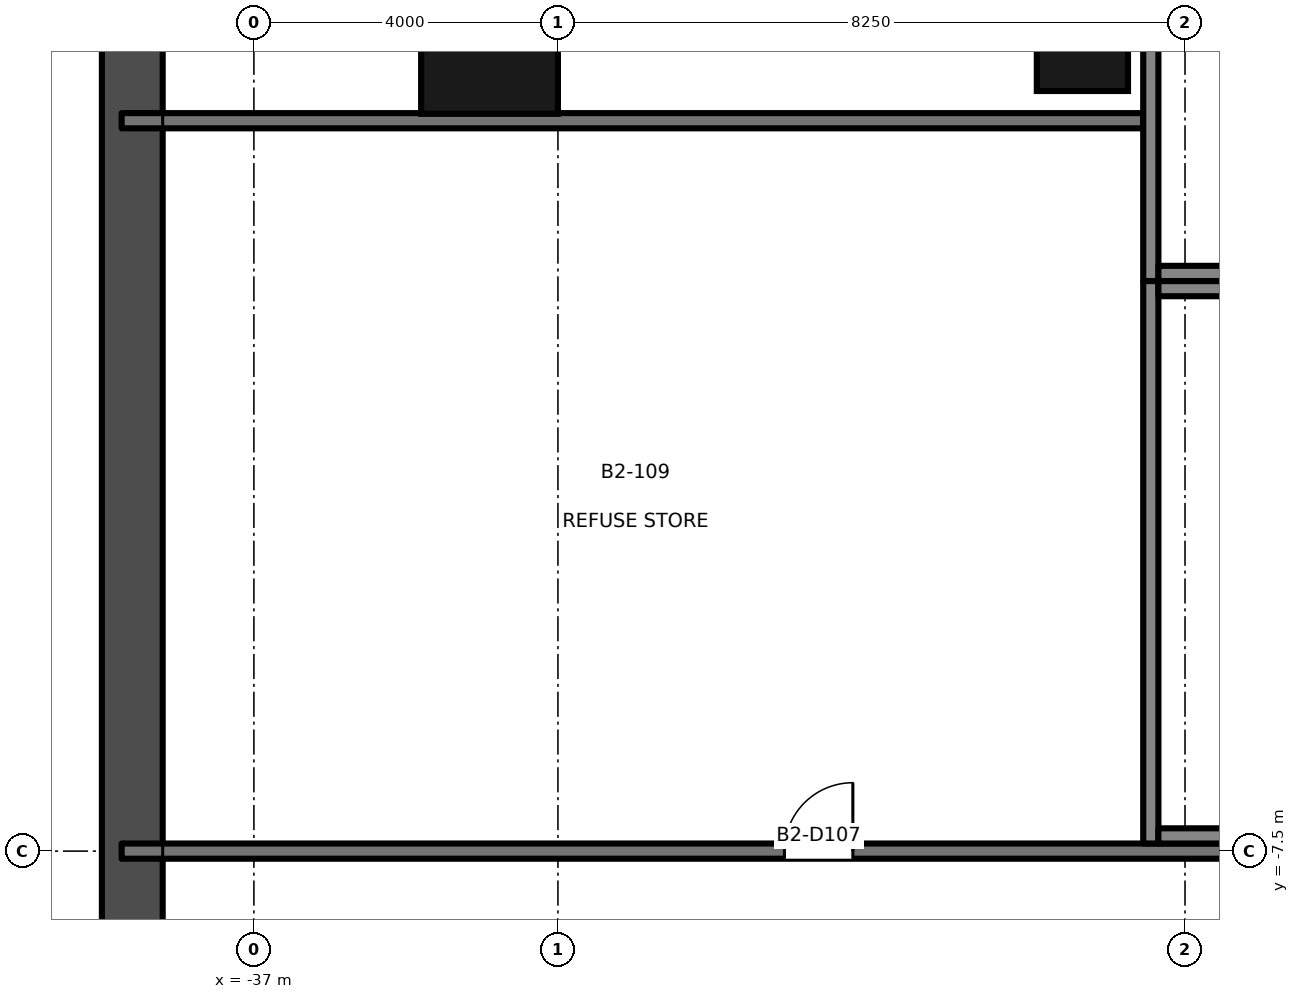
"""IFC4 building model, lengths in metres.
Left out: names, types, materials, properties, quantities, classifications, styles, units other than length and angle.
Written with IfcOpenShell. Run it as: python <this file> out.ifc"""

import sys

from ifc_helpers import new_model, si_unit, direction, frame, frame_2d, origin, origin_2d, place, context, subcontext, project, spatial, rectangle, extrude, element, fill, save


model = new_model("IFC4")
c1 = context("Model", 3, precision=1e-05, world=origin(), true_north=direction((0.0, 1.0)))
c2 = subcontext(c1, "Body", "Model", "MODEL_VIEW")
j1 = project(units=[si_unit("LENGTHUNIT", "METRE"), si_unit("PLANEANGLEUNIT", "RADIAN")], contexts=[c1])
p1 = place(None, origin())
s1 = spatial("IfcSite", under=j1, at=p1, CompositionType="ELEMENT")
p2 = place(p1, origin())
s2 = spatial("IfcBuilding", under=s1, at=p2, CompositionType="ELEMENT")
p3 = place(p2, frame((0.0, 0.0, -9.5)))
s3 = spatial("IfcBuildingStorey", under=s2, at=p3, CompositionType="ELEMENT", Elevation=-9.5)
p4 = place(p3, frame((-38.6, -38.7, -0.2), z_axis=(0.0, 0.0, 1.0), x_axis=(0.0, 1.0, 0.0)))
e1 = element("IfcWall", 1, at=p4, inside=s3, PredefinedType="SOLIDWALL", context=c2, shape_type="SweptSolid", body=[
    extrude(rectangle(XDim=51.9, YDim=0.8, at=frame_2d((25.95, 0.0))), origin(), (0.0, 0.0, 1.0), 4.0),
])
p5 = place(p3, frame((-33.9, 3.1, -0.2), z_axis=(0.0, 0.0, 1.0), x_axis=(0.0, 1.0, 0.0)))
e2 = element("IfcColumn", 2, at=p5, inside=s3, PredefinedType="COLUMN", context=c2, shape_type="SweptSolid", body=[
    extrude(rectangle(XDim=1.8, YDim=1.8, at=origin_2d()), origin(), (0.0, 0.0, 1.0), 4.0),
])
p6 = place(p3, frame((-26.1, 3.1, -0.2), z_axis=(0.0, 0.0, 1.0), x_axis=(1.0, 0.0, 0.0)))
e3 = element("IfcColumn", 3, at=p6, inside=s3, PredefinedType="COLUMN", context=c2, shape_type="SweptSolid", body=[
    extrude(rectangle(XDim=1.2, YDim=1.2, at=origin_2d()), origin(), (0.0, 0.0, 1.0), 4.0),
])
p7 = place(p3, frame((-25.2, -7.4, -0.2), z_axis=(0.0, 0.0, 1.0), x_axis=(0.0, 1.0, 0.0)))
e4 = element("IfcWall", 4, at=p7, inside=s3, PredefinedType="SHEAR", context=c2, shape_type="SweptSolid", body=[
    extrude(rectangle(XDim=7.4, YDim=0.2, at=frame_2d((3.7, 0.0))), origin(), (0.0, 0.0, 1.0), 4.0),
])
for number, where, z_axis, x_axis in (
    (5, (-25.1, -0.1, -0.2), (0.0, 0.0, 1.0), (1.0, 0.0, 0.0)),
    (6, (-25.1, -7.3, -0.2), (0.0, 0.0, 1.0), (1.0, 0.0, 0.0)),
):
    element("IfcWall", number, at=place(p3, frame(where, z_axis=z_axis, x_axis=x_axis)), inside=s3, PredefinedType="SHEAR", context=c2, shape_type="SweptSolid", body=[
        extrude(rectangle(XDim=4.5, YDim=0.2, at=frame_2d((2.25, 0.0))), origin(), (0.0, 0.0, 1.0), 4.0),
    ])
p8 = place(p3, frame((-25.2, 0.0, -0.2), z_axis=(0.0, 0.0, 1.0), x_axis=(0.0, 1.0, 0.0)))
e7 = element("IfcWall", 7, at=p8, inside=s3, PredefinedType="SHEAR", context=c2, shape_type="SweptSolid", body=[
    extrude(rectangle(XDim=7.4, YDim=0.2, at=frame_2d((3.7, 0.0))), origin(), (0.0, 0.0, 1.0), 4.0),
])
p9 = place(p3, frame((-25.1, 0.1, -0.2), z_axis=(0.0, 0.0, 1.0), x_axis=(1.0, 0.0, 0.0)))
e8 = element("IfcWall", 8, at=p9, inside=s3, PredefinedType="SHEAR", context=c2, shape_type="SweptSolid", body=[
    extrude(rectangle(XDim=4.5, YDim=0.2, at=frame_2d((2.25, 0.0))), origin(), (0.0, 0.0, 1.0), 4.0),
])
p10 = place(p3, frame((-38.74, -7.5, 0.0), z_axis=(0.0, 0.0, 1.0), x_axis=(1.0, 0.0, 0.0)))
e9 = element("IfcWall", 9, at=p10, inside=s3, PredefinedType="PARTITIONING", context=c2, shape_type="SweptSolid", body=[
    extrude(rectangle(XDim=18.34, YDim=0.2, at=frame_2d((9.17, 0.0))), origin(), (0.0, 0.0, 1.0), 2.6),
])
p11 = place(p10, frame((8.72, 0.0, 0.0)))
e10 = element("IfcOpeningElement", 10, at=p11, cuts=e9, PredefinedType="OPENING", context=c2, shape_type="SweptSolid", body=[
    extrude(rectangle(XDim=0.9, YDim=2.1, at=frame_2d((0.45, 1.05))), frame((0.0, 0.111, 0.0), z_axis=(0.0, -1.0, 0.0), x_axis=(1.0, 0.0, 0.0)), (0.0, 0.0, 1.0), 0.221),
])
p12 = place(p3, frame((-38.74, 2.109, 0.0), z_axis=(0.0, 0.0, 1.0), x_axis=(1.0, 0.0, 0.0)))
e11 = element("IfcWall", 11, at=p12, inside=s3, PredefinedType="PARTITIONING", context=c2, shape_type="SweptSolid", body=[
    extrude(rectangle(XDim=13.44, YDim=0.2, at=frame_2d((6.72, 0.0))), origin(), (0.0, 0.0, 1.0), 2.6),
])
p13 = place(p11, origin())
e12 = element("IfcDoor", 12, at=p13, inside=s3, OperationType="SINGLE_SWING_RIGHT", PredefinedType="DOOR", context=c2, shape_type="SweptSolid", body=[
    extrude(rectangle(XDim=0.9, YDim=2.1, at=frame_2d((0.45, 1.05))), frame((0.0, 0.025, 0.0), z_axis=(0.0, -1.0, 0.0), x_axis=(1.0, 0.0, 0.0)), (0.0, 0.0, 1.0), 0.05),
])
fill(e10, e12)
save(model, sys.argv[1])
